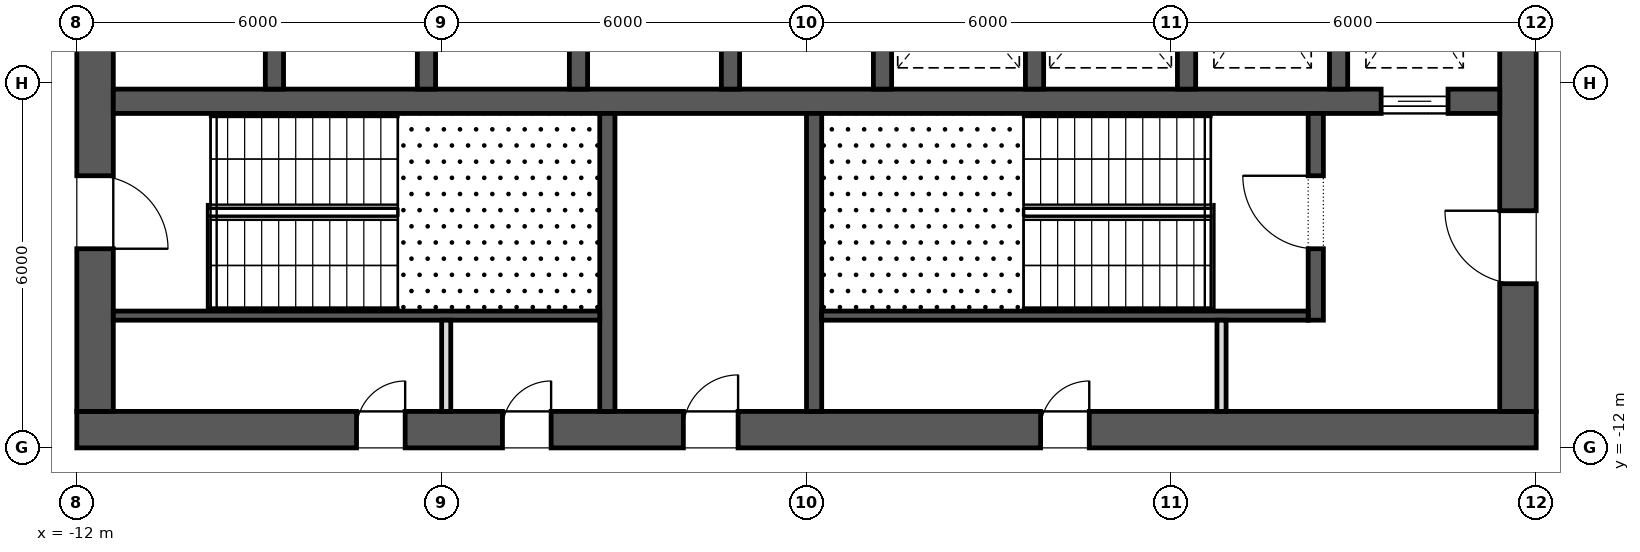
"""IFC4 building model, lengths in metres.
Left out: names, types, materials, properties, quantities, classifications, styles, units other than length and angle.
Written with IfcOpenShell. Run it as: python <this file> out.ifc"""

import sys

from ifc_helpers import new_model, si_unit, direction, frame, frame_2d, origin, place, context, subcontext, project, spatial, rectangle, extrude, element, fill, save


model = new_model("IFC4")
c1 = context("Model", 3, precision=1e-05, world=origin(), true_north=direction((0.0, 1.0)))
c2 = subcontext(c1, "Body", "Model", "MODEL_VIEW")
j1 = project(units=[si_unit("LENGTHUNIT", "METRE"), si_unit("PLANEANGLEUNIT", "RADIAN")], contexts=[c1])
p1 = place(None, origin())
s1 = spatial("IfcSite", under=j1, at=p1, CompositionType="ELEMENT")
p2 = place(p1, origin())
s2 = spatial("IfcBuilding", under=s1, at=p2, CompositionType="ELEMENT")
p3 = place(p2, frame((0.0, 0.0, 104.5)))
s3 = spatial("IfcBuildingStorey", under=s2, at=p3, CompositionType="ELEMENT", Elevation=104.5)
p4 = place(p3, frame((-12.0, -11.7, 0.0), z_axis=(0.0, 0.0, 1.0), x_axis=(1.0, 0.0, 0.0)))
e1 = element("IfcWall", 1, at=p4, inside=s3, PredefinedType="SHEAR", context=c2, shape_type="SweptSolid", body=[
    extrude(rectangle(XDim=24.0, YDim=0.6, at=frame_2d((12.0, 0.0))), origin(), (0.0, 0.0, 1.0), 4.2),
])
p5 = place(p4, frame((9.975, 0.0, 0.0)))
e2 = element("IfcOpeningElement", 2, at=p5, cuts=e1, PredefinedType="OPENING", context=c2, shape_type="SweptSolid", body=[
    extrude(rectangle(XDim=0.9, YDim=2.1, at=frame_2d((0.45, 1.05))), frame((0.0, 0.312, 0.0), z_axis=(0.0, -1.0, 0.0), x_axis=(1.0, 0.0, 0.0)), (0.0, 0.0, 1.0), 0.624),
])
p6 = place(p4, frame((4.6, 0.0, 0.0)))
e3 = element("IfcOpeningElement", 3, at=p6, cuts=e1, PredefinedType="OPENING", context=c2, shape_type="SweptSolid", body=[
    extrude(rectangle(XDim=0.8, YDim=2.1, at=frame_2d((0.4, 1.05))), frame((0.0, 0.312, 0.0), z_axis=(0.0, -1.0, 0.0), x_axis=(1.0, 0.0, 0.0)), (0.0, 0.0, 1.0), 0.624),
])
p7 = place(p4, frame((7.0, 0.0, 0.0)))
e4 = element("IfcOpeningElement", 4, at=p7, cuts=e1, PredefinedType="OPENING", context=c2, shape_type="SweptSolid", body=[
    extrude(rectangle(XDim=0.8, YDim=2.1, at=frame_2d((0.4, 1.05))), frame((0.0, 0.312, 0.0), z_axis=(0.0, -1.0, 0.0), x_axis=(1.0, 0.0, 0.0)), (0.0, 0.0, 1.0), 0.624),
])
p8 = place(p4, frame((15.85, 0.0, 0.0)))
e5 = element("IfcOpeningElement", 5, at=p8, cuts=e1, PredefinedType="OPENING", context=c2, shape_type="SweptSolid", body=[
    extrude(rectangle(XDim=0.8, YDim=2.1, at=frame_2d((0.4, 1.05))), frame((0.0, 0.312, 0.0), z_axis=(0.0, -1.0, 0.0), x_axis=(1.0, 0.0, 0.0)), (0.0, 0.0, 1.0), 0.624),
])
p9 = place(p3, frame((11.7, -11.4, 0.0), z_axis=(0.0, 0.0, 1.0), x_axis=(0.0, 1.0, 0.0)))
e6 = element("IfcWall", 6, at=p9, inside=s3, PredefinedType="SHEAR", context=c2, shape_type="SweptSolid", body=[
    extrude(rectangle(XDim=22.8, YDim=0.6, at=frame_2d((11.4, 0.0))), origin(), (0.0, 0.0, 1.0), 4.2),
])
p10 = place(p9, frame((10.2, 0.0, 0.0)))
e7 = element("IfcOpeningElement", 7, at=p10, cuts=e6, PredefinedType="OPENING", context=c2, shape_type="SweptSolid", body=[
    extrude(rectangle(XDim=2.4, YDim=2.1, at=frame_2d((1.2, 1.05))), frame((0.0, 0.312, 0.0), z_axis=(0.0, -1.0, 0.0), x_axis=(1.0, 0.0, 0.0)), (0.0, 0.0, 1.0), 0.624),
])
p11 = place(p9, frame((19.5, 0.0, 0.0)))
e8 = element("IfcOpeningElement", 8, at=p11, cuts=e6, PredefinedType="OPENING", context=c2, shape_type="SweptSolid", body=[
    extrude(rectangle(XDim=1.2, YDim=2.1, at=frame_2d((0.6, 1.05))), frame((0.0, 0.312, 0.0), z_axis=(0.0, -1.0, 0.0), x_axis=(1.0, 0.0, 0.0)), (0.0, 0.0, 1.0), 0.624),
])
p12 = place(p9, frame((2.1, 0.0, 0.0)))
e9 = element("IfcOpeningElement", 9, at=p12, cuts=e6, PredefinedType="OPENING", context=c2, shape_type="SweptSolid", body=[
    extrude(rectangle(XDim=1.2, YDim=2.1, at=frame_2d((0.6, 1.05))), frame((0.0, 0.312, 0.0), z_axis=(0.0, -1.0, 0.0), x_axis=(1.0, 0.0, 0.0)), (0.0, 0.0, 1.0), 0.624),
])
p13 = place(p3, frame((-11.7, -11.4, 0.0), z_axis=(0.0, 0.0, 1.0), x_axis=(0.0, 1.0, 0.0)))
e10 = element("IfcWall", 10, at=p13, inside=s3, PredefinedType="SHEAR", context=c2, shape_type="SweptSolid", body=[
    extrude(rectangle(XDim=22.8, YDim=0.6, at=frame_2d((11.4, 0.0))), origin(), (0.0, 0.0, 1.0), 4.2),
])
p14 = place(p13, frame((10.2, 0.0, 0.0)))
e11 = element("IfcOpeningElement", 11, at=p14, cuts=e10, PredefinedType="OPENING", context=c2, shape_type="SweptSolid", body=[
    extrude(rectangle(XDim=2.4, YDim=2.1, at=frame_2d((1.2, 1.05))), frame((0.0, 0.312, 0.0), z_axis=(0.0, -1.0, 0.0), x_axis=(1.0, 0.0, 0.0)), (0.0, 0.0, 1.0), 0.624),
])
p15 = place(p13, frame((18.925, 0.0, 0.0)))
e12 = element("IfcOpeningElement", 12, at=p15, cuts=e10, PredefinedType="OPENING", context=c2, shape_type="SweptSolid", body=[
    extrude(rectangle(XDim=1.2, YDim=2.1, at=frame_2d((0.6, 1.05))), frame((0.0, 0.312, 0.0), z_axis=(0.0, -1.0, 0.0), x_axis=(1.0, 0.0, 0.0)), (0.0, 0.0, 1.0), 0.624),
])
p16 = place(p13, frame((2.675, 0.0, 0.0)))
e13 = element("IfcOpeningElement", 13, at=p16, cuts=e10, PredefinedType="OPENING", context=c2, shape_type="SweptSolid", body=[
    extrude(rectangle(XDim=1.2, YDim=2.1, at=frame_2d((0.6, 1.05))), frame((0.0, 0.312, 0.0), z_axis=(0.0, -1.0, 0.0), x_axis=(1.0, 0.0, 0.0)), (0.0, 0.0, 1.0), 0.624),
])
p17 = place(p3, frame((-11.4, -6.3, 0.0), z_axis=(0.0, 0.0, 1.0), x_axis=(1.0, 0.0, 0.0)))
e14 = element("IfcWall", 14, at=p17, inside=s3, PredefinedType="SHEAR", context=c2, shape_type="SweptSolid", body=[
    extrude(rectangle(XDim=22.8, YDim=0.4, at=frame_2d((11.4, 0.0))), origin(), (0.0, 0.0, 1.0), 4.2),
])
p18 = place(p17, frame((20.85, 0.0, 0.0)))
e15 = element("IfcOpeningElement", 15, at=p18, cuts=e14, PredefinedType="OPENING", context=c2, shape_type="SweptSolid", body=[
    extrude(rectangle(XDim=1.1, YDim=2.1, at=frame_2d((0.55, 1.05))), frame((0.0, 0.212, 0.0), z_axis=(0.0, -1.0, 0.0), x_axis=(1.0, 0.0, 0.0)), (0.0, 0.0, 1.0), 0.424),
])
for number, where, z_axis, x_axis in (
    (16, (-8.75, -6.1, 0.0), (0.0, 0.0, 1.0), (0.0, 1.0, 0.0)),
    (17, (-6.25, -6.1, 0.0), (0.0, 0.0, 1.0), (0.0, 1.0, 0.0)),
    (18, (-3.75, -6.1, 0.0), (0.0, 0.0, 1.0), (0.0, 1.0, 0.0)),
    (19, (-1.25, -6.1, 0.0), (0.0, 0.0, 1.0), (0.0, 1.0, 0.0)),
    (20, (1.25, -6.1, 0.0), (0.0, 0.0, 1.0), (0.0, 1.0, 0.0)),
    (21, (3.75, -6.1, 0.0), (0.0, 0.0, 1.0), (0.0, 1.0, 0.0)),
    (22, (6.25, -6.1, 0.0), (0.0, 0.0, 1.0), (0.0, 1.0, 0.0)),
    (23, (8.75, -6.1, 0.0), (0.0, 0.0, 1.0), (0.0, 1.0, 0.0)),
):
    element("IfcWall", number, at=place(p3, frame(where, z_axis=z_axis, x_axis=x_axis)), inside=s3, PredefinedType="SHEAR", context=c2, shape_type="SweptSolid", body=[
        extrude(rectangle(XDim=2.9, YDim=0.3, at=frame_2d((1.45, 0.0))), origin(), (0.0, 0.0, 1.0), 4.2),
    ])
for number, where, z_axis, x_axis in (
    (24, (-3.275, -11.4, 0.0), (0.0, 0.0, 1.0), (0.0, 1.0, 0.0)),
    (25, (0.125, -11.4, 0.0), (0.0, 0.0, 1.0), (0.0, 1.0, 0.0)),
):
    element("IfcWall", number, at=place(p3, frame(where, z_axis=z_axis, x_axis=x_axis)), inside=s3, PredefinedType="SHEAR", context=c2, shape_type="SweptSolid", body=[
        extrude(rectangle(XDim=4.9, YDim=0.25, at=frame_2d((2.45, 0.0))), origin(), (0.0, 0.0, 1.0), 3.9),
    ])
p19 = place(p3, frame((8.375, -9.9, 0.0), z_axis=(0.0, 0.0, 1.0), x_axis=(0.0, 1.0, 0.0)))
e26 = element("IfcWall", 26, at=p19, inside=s3, PredefinedType="SHEAR", context=c2, shape_type="SweptSolid", body=[
    extrude(rectangle(XDim=3.4, YDim=0.25, at=frame_2d((1.7, 0.0))), origin(), (0.0, 0.0, 1.0), 3.9),
])
p20 = place(p19, frame((1.175, 0.0, 0.0)))
e27 = element("IfcOpeningElement", 27, at=p20, cuts=e26, PredefinedType="OPENING", context=c2, shape_type="SweptSolid", body=[
    extrude(rectangle(XDim=1.2, YDim=2.1, at=frame_2d((0.6, 1.05))), frame((0.0, 0.137, 0.0), z_axis=(0.0, -1.0, 0.0), x_axis=(1.0, 0.0, 0.0)), (0.0, 0.0, 1.0), 0.274),
])
for number, where, z_axis, x_axis in (
    (28, (-11.4, -9.825, 0.0), (0.0, 0.0, 1.0), (1.0, 0.0, 0.0)),
    (29, (0.25, -9.825, 0.0), (0.0, 0.0, 1.0), (1.0, 0.0, 0.0)),
):
    element("IfcWall", number, at=place(p3, frame(where, z_axis=z_axis, x_axis=x_axis)), inside=s3, PredefinedType="SHEAR", context=c2, shape_type="SweptSolid", body=[
        extrude(rectangle(XDim=8.0, YDim=0.15, at=frame_2d((4.0, 0.0))), origin(), (0.0, 0.0, 1.0), 3.9),
    ])
for number, where, z_axis, x_axis in (
    (30, (-5.925, -11.4, 0.0), (0.0, 0.0, 1.0), (0.0, 1.0, 0.0)),
    (31, (6.825, -11.4, 0.0), (0.0, 0.0, 1.0), (0.0, 1.0, 0.0)),
):
    element("IfcWall", number, at=place(p3, frame(where, z_axis=z_axis, x_axis=x_axis)), inside=s3, PredefinedType="PARTITIONING", context=c2, shape_type="SweptSolid", body=[
        extrude(rectangle(XDim=1.5, YDim=0.15, at=frame_2d((0.75, 0.0))), origin(), (0.0, 0.0, 1.0), 3.9),
    ])
p21 = place(p18, origin())
e32 = element("IfcDoor", 32, at=p21, inside=s3, OperationType="SLIDING_TO_LEFT", PredefinedType="DOOR", context=c2, shape_type="SweptSolid", body=[
    extrude(rectangle(XDim=1.1, YDim=2.1, at=frame_2d((0.55, 1.05))), frame((0.0, 0.025, 0.0), z_axis=(0.0, -1.0, 0.0), x_axis=(1.0, 0.0, 0.0)), (0.0, 0.0, 1.0), 0.05),
])
fill(e15, e32)
p22 = place(p16, frame((1.2, 0.0, 0.0), z_axis=(0.0, 0.0, 1.0), x_axis=(-1.0, 0.0, 0.0)))
e33 = element("IfcDoor", 33, at=p22, inside=s3, OperationType="SINGLE_SWING_LEFT", PredefinedType="DOOR", context=c2, shape_type="SweptSolid", body=[
    extrude(rectangle(XDim=1.2, YDim=2.1, at=frame_2d((0.6, 1.05))), frame((0.0, 0.025, 0.0), z_axis=(0.0, -1.0, 0.0), x_axis=(1.0, 0.0, 0.0)), (0.0, 0.0, 1.0), 0.05),
])
fill(e13, e33)
p23 = place(p20, origin())
e34 = element("IfcDoor", 34, at=p23, inside=s3, OperationType="SINGLE_SWING_LEFT", PredefinedType="DOOR", context=c2, shape_type="SweptSolid", body=[
    extrude(rectangle(XDim=1.2, YDim=2.1, at=frame_2d((0.6, 1.05))), frame((0.0, 0.025, 0.0), z_axis=(0.0, -1.0, 0.0), x_axis=(1.0, 0.0, 0.0)), (0.0, 0.0, 1.0), 0.05),
])
fill(e27, e34)
p24 = place(p12, origin())
e35 = element("IfcDoor", 35, at=p24, inside=s3, OperationType="SINGLE_SWING_LEFT", PredefinedType="DOOR", context=c2, shape_type="SweptSolid", body=[
    extrude(rectangle(XDim=1.2, YDim=2.1, at=frame_2d((0.6, 1.05))), frame((0.0, 0.025, 0.0), z_axis=(0.0, -1.0, 0.0), x_axis=(1.0, 0.0, 0.0)), (0.0, 0.0, 1.0), 0.05),
])
fill(e9, e35)
p25 = place(p5, origin())
e36 = element("IfcDoor", 36, at=p25, inside=s3, OperationType="SINGLE_SWING_LEFT", PredefinedType="DOOR", context=c2, shape_type="SweptSolid", body=[
    extrude(rectangle(XDim=0.9, YDim=2.1, at=frame_2d((0.45, 1.05))), frame((0.0, 0.025, 0.0), z_axis=(0.0, -1.0, 0.0), x_axis=(1.0, 0.0, 0.0)), (0.0, 0.0, 1.0), 0.05),
])
fill(e2, e36)
p26 = place(p6, origin())
e37 = element("IfcDoor", 37, at=p26, inside=s3, OperationType="SINGLE_SWING_LEFT", PredefinedType="DOOR", context=c2, shape_type="SweptSolid", body=[
    extrude(rectangle(XDim=0.8, YDim=2.1, at=frame_2d((0.4, 1.05))), frame((0.0, 0.025, 0.0), z_axis=(0.0, -1.0, 0.0), x_axis=(1.0, 0.0, 0.0)), (0.0, 0.0, 1.0), 0.05),
])
fill(e3, e37)
p27 = place(p7, origin())
e38 = element("IfcDoor", 38, at=p27, inside=s3, OperationType="SINGLE_SWING_LEFT", PredefinedType="DOOR", context=c2, shape_type="SweptSolid", body=[
    extrude(rectangle(XDim=0.8, YDim=2.1, at=frame_2d((0.4, 1.05))), frame((0.0, 0.025, 0.0), z_axis=(0.0, -1.0, 0.0), x_axis=(1.0, 0.0, 0.0)), (0.0, 0.0, 1.0), 0.05),
])
fill(e4, e38)
p28 = place(p8, origin())
e39 = element("IfcDoor", 39, at=p28, inside=s3, OperationType="SINGLE_SWING_LEFT", PredefinedType="DOOR", context=c2, shape_type="SweptSolid", body=[
    extrude(rectangle(XDim=0.8, YDim=2.1, at=frame_2d((0.4, 1.05))), frame((0.0, 0.025, 0.0), z_axis=(0.0, -1.0, 0.0), x_axis=(1.0, 0.0, 0.0)), (0.0, 0.0, 1.0), 0.05),
])
fill(e5, e39)
save(model, sys.argv[1])
